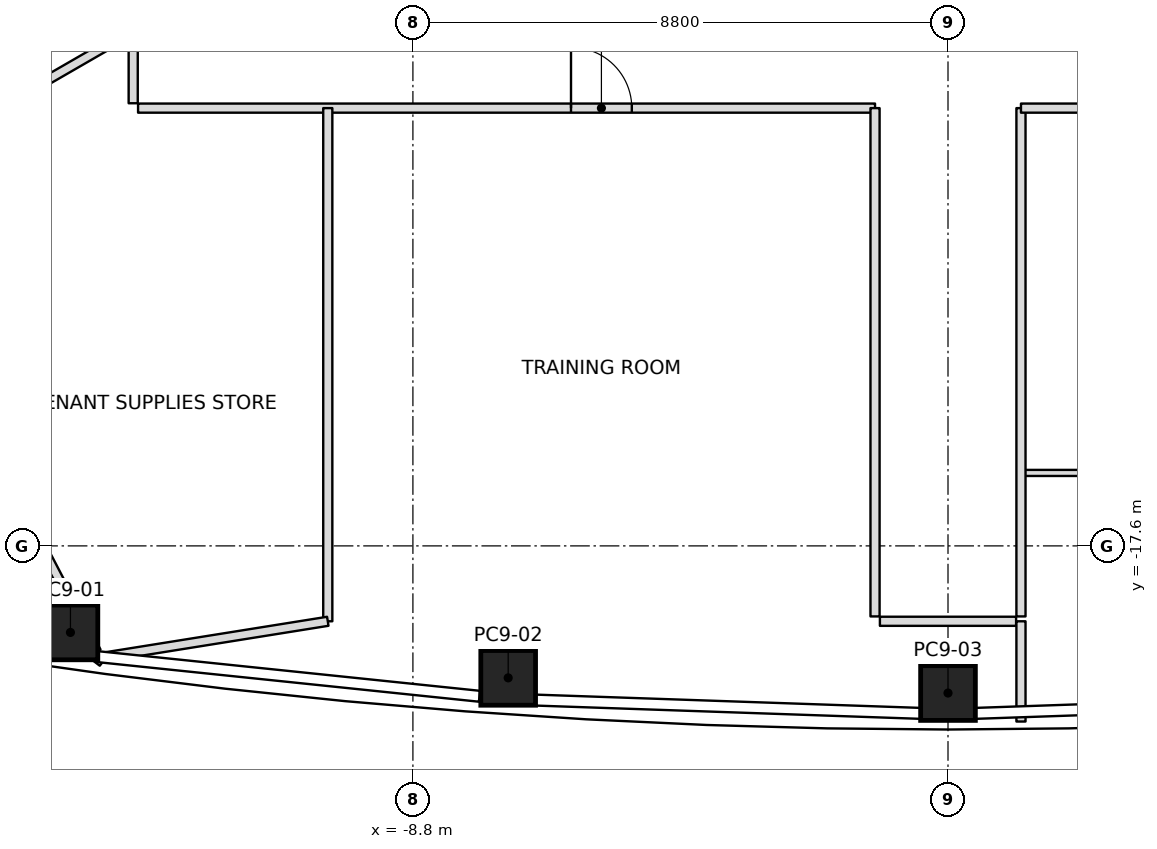
"""IFC4 building model, lengths in metres.
Left out: names, types, materials, properties, quantities, classifications, styles, units other than length and angle.
Written with IfcOpenShell. Run it as: python <this file> out.ifc"""

import sys

from ifc_helpers import new_model, si_unit, direction, frame, frame_2d, origin, origin_2d, place, context, subcontext, project, spatial, rectangle, extrude, element, fill, save


model = new_model("IFC4")
c1 = context("Model", 3, precision=1e-05, world=origin(), true_north=direction((0.0, 1.0)))
c2 = subcontext(c1, "Body", "Model", "MODEL_VIEW")
j1 = project(units=[si_unit("LENGTHUNIT", "METRE"), si_unit("PLANEANGLEUNIT", "RADIAN")], contexts=[c1])
p1 = place(None, origin())
s1 = spatial("IfcSite", under=j1, at=p1, CompositionType="ELEMENT")
p2 = place(p1, origin())
s2 = spatial("IfcBuilding", under=s1, at=p2, CompositionType="ELEMENT")
p3 = place(p2, frame((0.0, 0.0, 303.0)))
s3 = spatial("IfcBuildingStorey", under=s2, at=p3, CompositionType="ELEMENT", Elevation=303.0)
p4 = place(p3, frame((-14.432, -19.023, 0.0), z_axis=(0.017391452496, 0.010373848857, 0.999794939295), x_axis=(-0.990356057781, 0.137641808402, 0.01579909479)))
e1 = element("IfcColumn", 1, at=p4, inside=s3, PredefinedType="COLUMN", context=c2, shape_type="SweptSolid", body=[
    extrude(rectangle(XDim=0.9, YDim=0.9, at=origin_2d()), origin(), (0.0, 0.0, 1.0), 4.001),
])
p5 = place(p3, frame((-7.233, -19.771, 0.0), z_axis=(0.008727150594, 0.011168311599, 0.999899547784), x_axis=(-0.997585590685, 0.06899278007, 0.007936344038)))
e2 = element("IfcColumn", 2, at=p5, inside=s3, PredefinedType="COLUMN", context=c2, shape_type="SweptSolid", body=[
    extrude(rectangle(XDim=0.9, YDim=0.9, at=origin_2d()), origin(), (0.0, 0.0, 1.0), 4.0),
])
p6 = place(p3, frame((0.0, -20.02, 0.0), z_axis=(0.0, 0.01141283087, 0.999934871525), x_axis=(1.0, 0.0, 0.0)))
e3 = element("IfcColumn", 3, at=p6, inside=s3, PredefinedType="COLUMN", context=c2, shape_type="SweptSolid", body=[
    extrude(rectangle(XDim=0.9, YDim=0.9, at=origin_2d()), origin(), (0.0, 0.0, 1.0), 4.0),
])
p7 = place(p3, frame((-17.957, -11.753, 0.0), z_axis=(0.0, 0.0, 1.0), x_axis=(0.462142572693, -0.886805639644, 0.0)))
e4 = element("IfcWall", 4, at=p7, inside=s3, PredefinedType="PARTITIONING", context=c2, shape_type="SweptSolid", body=[
    extrude(rectangle(XDim=8.553, YDim=0.15, at=frame_2d((4.276, 0.0))), origin(), (0.0, 0.0, 1.0), 3.3),
])
p8 = place(p3, frame((-10.2, -10.4, 0.0), z_axis=(0.0, 0.0, 1.0), x_axis=(0.0, -1.0, 0.0)))
e5 = element("IfcWall", 5, at=p8, inside=s3, PredefinedType="PARTITIONING", context=c2, shape_type="SweptSolid", body=[
    extrude(rectangle(XDim=8.44, YDim=0.15, at=frame_2d((4.22, 0.0))), origin(), (0.0, 0.0, 1.0), 3.3),
])
p9 = place(p3, frame((-10.2, -18.84, 0.0), z_axis=(0.0, 0.0, 1.0), x_axis=(-0.987451332471, -0.157923608119, 0.0)))
e6 = element("IfcWall", 6, at=p9, inside=s3, PredefinedType="PARTITIONING", context=c2, shape_type="SweptSolid", body=[
    extrude(rectangle(XDim=3.701, YDim=0.15, at=frame_2d((1.851, 0.0))), origin(), (0.0, 0.0, 1.0), 3.234),
])
p10 = place(p3, frame((-13.905, -19.511, 0.0), z_axis=(0.0, 0.0, 1.0), x_axis=(-0.796009034685, 0.605284740185, 0.0)))
e7 = element("IfcWall", 7, at=p10, inside=s3, PredefinedType="PARTITIONING", context=c2, shape_type="SweptSolid", body=[
    extrude(rectangle(XDim=0.184, YDim=0.15, at=frame_2d((0.092, 0.0))), origin(), (0.0, 0.0, 1.0), 3.3),
])
p11 = place(p3, frame((1.2, -18.84, 0.0), z_axis=(0.0, 0.0, 1.0), x_axis=(0.0, -1.0, 0.0)))
e8 = element("IfcWall", 8, at=p11, inside=s3, PredefinedType="PARTITIONING", context=c2, shape_type="SweptSolid", body=[
    extrude(rectangle(XDim=1.649, YDim=0.15, at=frame_2d((0.824, 0.0))), origin(), (0.0, 0.0, 1.0), 3.234),
])
p12 = place(p3, frame((-13.4, -6.351, 0.0), z_axis=(0.0, 0.0, 1.0), x_axis=(-0.866027119138, -0.499997028909, 0.0)))
e9 = element("IfcWall", 9, at=p12, inside=s3, PredefinedType="PARTITIONING", context=c2, shape_type="SweptSolid", body=[
    extrude(rectangle(XDim=6.568, YDim=0.15, at=frame_2d((3.284, 0.0))), origin(), (0.0, 0.0, 1.0), 3.3),
])
p13 = place(p3, frame((-17.888, -11.713, 0.0), z_axis=(0.0, 0.0, 1.0), x_axis=(0.866022397746, 0.500005206576, 0.0)))
e10 = element("IfcWall", 10, at=p13, inside=s3, PredefinedType="PARTITIONING", context=c2, shape_type="SweptSolid", body=[
    extrude(rectangle(XDim=5.182, YDim=0.15, at=frame_2d((2.591, 0.0))), origin(), (0.0, 0.0, 1.0), 3.233),
])
p14 = place(p13, frame((2.051, 0.0, 0.0)))
e11 = element("IfcOpeningElement", 11, at=p14, cuts=e10, PredefinedType="OPENING", context=c2, shape_type="SweptSolid", body=[
    extrude(rectangle(XDim=1.0, YDim=2.1, at=frame_2d((0.5, 1.05))), frame((0.0, 0.075, 0.0), z_axis=(0.0, -1.0, 0.0), x_axis=(1.0, 0.0, 0.0)), (0.0, 0.0, 1.0), 0.15),
])
p15 = place(p3, frame((-13.4, -9.214, 0.0), z_axis=(0.0, 0.0, 1.0), x_axis=(0.0, -1.0, 0.0)))
e12 = element("IfcWall", 12, at=p15, inside=s3, PredefinedType="PARTITIONING", context=c2, shape_type="SweptSolid", body=[
    extrude(rectangle(XDim=1.106, YDim=0.15, at=frame_2d((0.553, 0.0))), origin(), (0.0, 0.0, 1.0), 3.233),
])
p16 = place(p3, frame((-13.32, -10.4, 0.0), z_axis=(0.0, 0.0, 1.0), x_axis=(1.0, 0.0, 0.0)))
e13 = element("IfcWall", 13, at=p16, inside=s3, PredefinedType="PARTITIONING", context=c2, shape_type="SweptSolid", body=[
    extrude(rectangle(XDim=12.12, YDim=0.15, at=frame_2d((6.06, 0.0))), origin(), (0.0, 0.0, 1.0), 3.3),
])
p17 = place(p16, frame((7.12, 0.0, 0.0)))
e14 = element("IfcOpeningElement", 14, at=p17, cuts=e13, PredefinedType="OPENING", context=c2, shape_type="SweptSolid", body=[
    extrude(rectangle(XDim=1.0, YDim=2.1, at=frame_2d((0.5, 1.05))), frame((0.0, 0.075, 0.0), z_axis=(0.0, -1.0, 0.0), x_axis=(1.0, 0.0, 0.0)), (0.0, 0.0, 1.0), 0.15),
])
p18 = place(p3, frame((-1.2, -10.4, 0.0), z_axis=(0.0, 0.0, 1.0), x_axis=(0.0, -1.0, 0.0)))
e15 = element("IfcWall", 15, at=p18, inside=s3, PredefinedType="PARTITIONING", context=c2, shape_type="SweptSolid", body=[
    extrude(rectangle(XDim=8.36, YDim=0.15, at=frame_2d((4.18, 0.0))), origin(), (0.0, 0.0, 1.0), 3.3),
])
p19 = place(p3, frame((-1.12, -18.84, 0.0), z_axis=(0.0, 0.0, 1.0), x_axis=(1.0, 0.0, 0.0)))
e16 = element("IfcWall", 16, at=p19, inside=s3, PredefinedType="PARTITIONING", context=c2, shape_type="SweptSolid", body=[
    extrude(rectangle(XDim=2.24, YDim=0.15, at=frame_2d((1.12, 0.0))), origin(), (0.0, 0.0, 1.0), 3.3),
])
p20 = place(p3, frame((1.2, -18.76, 0.0), z_axis=(0.0, 0.0, 1.0), x_axis=(0.0, 1.0, 0.0)))
e17 = element("IfcWall", 17, at=p20, inside=s3, PredefinedType="PARTITIONING", context=c2, shape_type="SweptSolid", body=[
    extrude(rectangle(XDim=8.36, YDim=0.15, at=frame_2d((4.18, 0.0))), origin(), (0.0, 0.0, 1.0), 3.3),
])
p21 = place(p3, frame((1.2, -10.4, 0.0), z_axis=(0.0, 0.0, 1.0), x_axis=(1.0, 0.0, 0.0)))
e18 = element("IfcWall", 18, at=p21, inside=s3, PredefinedType="PARTITIONING", context=c2, shape_type="SweptSolid", body=[
    extrude(rectangle(XDim=12.12, YDim=0.15, at=frame_2d((6.06, 0.0))), origin(), (0.0, 0.0, 1.0), 3.3),
])
p22 = place(p21, frame((2.05, 0.0, 0.0)))
e19 = element("IfcOpeningElement", 19, at=p22, cuts=e18, PredefinedType="OPENING", context=c2, shape_type="SweptSolid", body=[
    extrude(rectangle(XDim=0.9, YDim=2.1, at=frame_2d((0.45, 1.05))), frame((0.0, 0.075, 0.0), z_axis=(0.0, -1.0, 0.0), x_axis=(1.0, 0.0, 0.0)), (0.0, 0.0, 1.0), 0.15),
])
p23 = place(p21, frame((8.15, 0.0, 0.0)))
e20 = element("IfcOpeningElement", 20, at=p23, cuts=e18, PredefinedType="OPENING", context=c2, shape_type="SweptSolid", body=[
    extrude(rectangle(XDim=1.0, YDim=2.1, at=frame_2d((0.5, 1.05))), frame((0.0, 0.075, 0.0), z_axis=(0.0, -1.0, 0.0), x_axis=(1.0, 0.0, 0.0)), (0.0, 0.0, 1.0), 0.15),
])
p24 = place(p3, frame((6.2, -16.4, 0.0), z_axis=(0.0, 0.0, 1.0), x_axis=(-1.0, 0.0, 0.0)))
e21 = element("IfcWall", 21, at=p24, inside=s3, PredefinedType="PARTITIONING", context=c2, shape_type="SweptSolid", body=[
    extrude(rectangle(XDim=4.97, YDim=0.1, at=frame_2d((2.485, 0.0))), origin(), (0.0, 0.0, 1.0), 3.3),
])
p25 = place(p17, origin())
e22 = element("IfcDoor", 22, at=p25, inside=s3, OperationType="SINGLE_SWING_LEFT", PredefinedType="DOOR", context=c2, shape_type="SweptSolid", body=[
    extrude(rectangle(XDim=1.0, YDim=2.1, at=frame_2d((0.5, 1.05))), frame((0.0, 0.025, 0.0), z_axis=(0.0, -1.0, 0.0), x_axis=(1.0, 0.0, 0.0)), (0.0, 0.0, 1.0), 0.05),
])
fill(e14, e22)
save(model, sys.argv[1])
